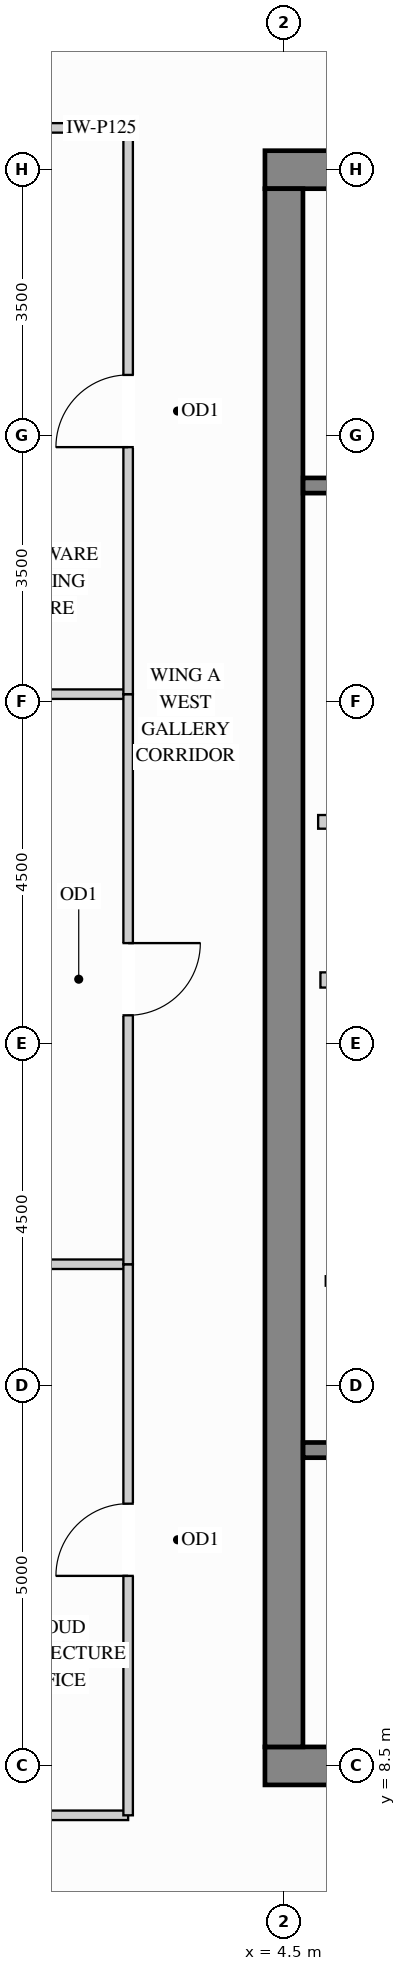
"""IFC4 building model, lengths in metres.
Left out: names, types, materials, properties, quantities, classifications, styles, units other than length and angle.
Written with IfcOpenShell. Run it as: python <this file> out.ifc"""

import sys

from ifc_helpers import new_model, si_unit, direction, frame, frame_2d, origin, place, context, subcontext, project, spatial, rectangle, extrude, source, transform, mapped, element, fill, save


model = new_model("IFC4")
c1 = context("Model", 3, precision=1e-05, world=origin(), true_north=direction((0.0, 1.0)))
c2 = subcontext(c1, "Body", "Model", "MODEL_VIEW")
j1 = project(units=[si_unit("LENGTHUNIT", "METRE"), si_unit("PLANEANGLEUNIT", "RADIAN")], contexts=[c1])
p1 = place(None, origin())
s1 = spatial("IfcSite", under=j1, at=p1, CompositionType="ELEMENT")
p2 = place(p1, origin())
s2 = spatial("IfcBuilding", under=s1, at=p2, CompositionType="ELEMENT")
p3 = place(p2, frame((0.0, 0.0, 266.4)))
s3 = spatial("IfcBuildingStorey", under=s2, at=p3, CompositionType="ELEMENT", Elevation=266.4)
m1 = source(origin(), c2, "Body", "SweptSolid", [
    extrude(rectangle(XDim=10.5, YDim=0.5, at=frame_2d((5.25, 0.0))), origin(), (0.0, 0.0, 1.0), 3.4),
])
for number, where, z_axis, x_axis in (
    (1, (4.25, 29.5, 0.0), (0.0, 0.0, 1.0), (1.0, 0.0, 0.0)),
    (2, (4.25, 8.5, 0.0), (0.0, 0.0, 1.0), (1.0, 0.0, 0.0)),
):
    element("IfcWall", number, at=place(p3, frame(where, z_axis=z_axis, x_axis=x_axis)), inside=s3, PredefinedType="SHEAR", context=c2, shape_type="MappedRepresentation", body=[
        mapped(m1, transform((0.0, 0.0, 0.0), x_axis=(1.0, 0.0, 0.0), y_axis=(0.0, 1.0, 0.0), z_axis=(0.0, 0.0, 1.0))),
    ])
m2 = source(origin(), c2, "Body", "SweptSolid", [
    extrude(rectangle(XDim=20.5, YDim=0.5, at=frame_2d((10.25, 0.0))), origin(), (0.0, 0.0, 1.0), 3.4),
])
p4 = place(p3, frame((4.5, 8.75, 0.0), z_axis=(0.0, 0.0, 1.0), x_axis=(0.0, 1.0, 0.0)))
e3 = element("IfcWall", 3, at=p4, inside=s3, PredefinedType="SHEAR", context=c2, shape_type="MappedRepresentation", body=[
    mapped(m2, transform((0.0, 0.0, 0.0), x_axis=(1.0, 0.0, 0.0), y_axis=(0.0, 1.0, 0.0), z_axis=(0.0, 0.0, 1.0))),
])
m3 = source(origin(), c2, "Body", "SweptSolid", [
    extrude(rectangle(XDim=2.2, YDim=0.18, at=frame_2d((1.1, 0.0))), origin(), (0.0, 0.0, 1.0), 3.385),
])
p5 = place(p3, frame((4.95, 20.92, 0.0), z_axis=(0.0, 0.0, 1.0), x_axis=(1.0, 0.0, 0.0)))
e4 = element("IfcWall", 4, at=p5, inside=s3, PredefinedType="PARTITIONING", context=c2, shape_type="MappedRepresentation", body=[
    mapped(m3, transform((0.0, 0.0, 0.0), x_axis=(1.0, 0.0, 0.0), y_axis=(0.0, 1.0, 0.0), z_axis=(0.0, 0.0, 1.0))),
])
p6 = place(p3, frame((5.05, 14.88, 0.0), z_axis=(0.0, 0.0, 1.0), x_axis=(1.0, 0.0, 0.0)))
e5 = element("IfcWall", 5, at=p6, inside=s3, PredefinedType="PARTITIONING", context=c2, shape_type="SweptSolid", body=[
    extrude(rectangle(XDim=2.35, YDim=0.125, at=frame_2d((1.175, 0.0))), origin(), (0.0, 0.0, 1.0), 3.385),
])
p7 = place(p6, frame((0.7, 0.0, 0.0)))
e6 = element("IfcOpeningElement", 6, at=p7, cuts=e5, PredefinedType="OPENING", context=c2, shape_type="SweptSolid", body=[
    extrude(rectangle(XDim=0.85, YDim=2.1, at=frame_2d((0.425, 1.05))), frame((0.0, 0.073, 0.0), z_axis=(0.0, -1.0, 0.0), x_axis=(1.0, 0.0, 0.0)), (0.0, 0.0, 1.0), 0.145),
])
m4 = source(origin(), c2, "Body", "SweptSolid", [
    extrude(rectangle(XDim=1.4, YDim=0.125, at=frame_2d((0.7, 0.0))), origin(), (0.0, 0.0, 1.0), 3.385),
])
p8 = place(p3, frame((1.05, 30.05, 0.0), z_axis=(0.0, 0.0, 1.0), x_axis=(1.0, 0.0, 0.0)))
e7 = element("IfcWall", 7, at=p8, inside=s3, PredefinedType="PARTITIONING", context=c2, shape_type="MappedRepresentation", body=[
    mapped(m4, transform((0.0, 0.0, 0.0), x_axis=(1.0, 0.0, 0.0), y_axis=(0.0, 1.0, 0.0), z_axis=(0.0, 0.0, 1.0))),
])
m5 = source(origin(), c2, "Body", "SweptSolid", [
    extrude(rectangle(XDim=2.098, YDim=0.125, at=frame_2d((1.049, 0.0))), origin(), (0.0, 0.0, 1.0), 3.385),
])
for number, where, z_axis, x_axis in (
    (8, (0.352, 7.85, 0.0), (0.0, 0.0, 1.0), (1.0, 0.0, 0.0)),
    (9, (0.352, 15.1, 0.0), (0.0, 0.0, 1.0), (1.0, 0.0, 0.0)),
):
    element("IfcWall", number, at=place(p3, frame(where, z_axis=z_axis, x_axis=x_axis)), inside=s3, PredefinedType="PARTITIONING", context=c2, shape_type="MappedRepresentation", body=[
        mapped(m5, transform((0.0, 0.0, 0.0), x_axis=(1.0, 0.0, 0.0), y_axis=(0.0, 1.0, 0.0), z_axis=(0.0, 0.0, 1.0))),
    ])
p9 = place(p3, frame((1.05, 22.6, 0.0), z_axis=(0.0, 0.0, 1.0), x_axis=(1.0, 0.0, 0.0)))
e10 = element("IfcWall", 10, at=p9, inside=s3, PredefinedType="PARTITIONING", context=c2, shape_type="MappedRepresentation", body=[
    mapped(m4, transform((0.0, 0.0, 0.0), x_axis=(1.0, 0.0, 0.0), y_axis=(0.0, 1.0, 0.0), z_axis=(0.0, 0.0, 1.0))),
])
p10 = place(p3, frame((2.45, 7.85, 0.0), z_axis=(0.0, 0.0, 1.0), x_axis=(0.0, 1.0, 0.0)))
e11 = element("IfcWall", 11, at=p10, inside=s3, PredefinedType="PARTITIONING", context=c2, shape_type="SweptSolid", body=[
    extrude(rectangle(XDim=7.25, YDim=0.125, at=frame_2d((3.625, 0.0))), origin(), (0.0, 0.0, 1.0), 3.385),
])
p11 = place(p10, frame((3.15, 0.0, 0.0)))
e12 = element("IfcOpeningElement", 12, at=p11, cuts=e11, PredefinedType="OPENING", context=c2, shape_type="SweptSolid", body=[
    extrude(rectangle(XDim=0.95, YDim=2.15, at=frame_2d((0.475, 1.075))), frame((0.0, 0.073, 0.0), z_axis=(0.0, -1.0, 0.0), x_axis=(1.0, 0.0, 0.0)), (0.0, 0.0, 1.0), 0.145),
])
p12 = place(p3, frame((2.45, 15.1, 0.0), z_axis=(0.0, 0.0, 1.0), x_axis=(0.0, 1.0, 0.0)))
e13 = element("IfcWall", 13, at=p12, inside=s3, PredefinedType="PARTITIONING", context=c2, shape_type="SweptSolid", body=[
    extrude(rectangle(XDim=7.5, YDim=0.125, at=frame_2d((3.75, 0.0))), origin(), (0.0, 0.0, 1.0), 3.385),
])
p13 = place(p12, frame((3.275, 0.0, 0.0)))
e14 = element("IfcOpeningElement", 14, at=p13, cuts=e13, PredefinedType="OPENING", context=c2, shape_type="SweptSolid", body=[
    extrude(rectangle(XDim=0.95, YDim=2.15, at=frame_2d((0.475, 1.075))), frame((0.0, 0.073, 0.0), z_axis=(0.0, -1.0, 0.0), x_axis=(1.0, 0.0, 0.0)), (0.0, 0.0, 1.0), 0.145),
])
p14 = place(p3, frame((2.45, 22.6, 0.0), z_axis=(0.0, 0.0, 1.0), x_axis=(0.0, 1.0, 0.0)))
e15 = element("IfcWall", 15, at=p14, inside=s3, PredefinedType="PARTITIONING", context=c2, shape_type="SweptSolid", body=[
    extrude(rectangle(XDim=7.45, YDim=0.125, at=frame_2d((3.725, 0.0))), origin(), (0.0, 0.0, 1.0), 3.385),
])
p15 = place(p14, frame((3.25, 0.0, 0.0)))
e16 = element("IfcOpeningElement", 16, at=p15, cuts=e15, PredefinedType="OPENING", context=c2, shape_type="SweptSolid", body=[
    extrude(rectangle(XDim=0.95, YDim=2.15, at=frame_2d((0.475, 1.075))), frame((0.0, 0.073, 0.0), z_axis=(0.0, -1.0, 0.0), x_axis=(1.0, 0.0, 0.0)), (0.0, 0.0, 1.0), 0.145),
])
m6 = source(origin(), c2, "Body", "SweptSolid", [
    extrude(rectangle(XDim=2.09, YDim=0.2, at=frame_2d((1.045, 0.0))), origin(), (0.0, 0.0, 1.0), 3.385),
])
p16 = place(p3, frame((4.98, 18.84, 0.0), z_axis=(0.0, 0.0, 1.0), x_axis=(1.0, 0.0, 0.0)))
e17 = element("IfcWall", 17, at=p16, inside=s3, PredefinedType="PARTITIONING", context=c2, shape_type="MappedRepresentation", body=[
    mapped(m6, transform((0.0, 0.0, 0.0), x_axis=(1.0, 0.0, 0.0), y_axis=(0.0, 1.0, 0.0), z_axis=(0.0, 0.0, 1.0))),
])
p17 = place(p3, frame((4.752, 12.655, 0.0), z_axis=(0.0, 0.0, 1.0), x_axis=(1.0, 0.0, 0.0)))
e18 = element("IfcWall", 18, at=p17, inside=s3, PredefinedType="SHEAR", context=c2, shape_type="SweptSolid", body=[
    extrude(rectangle(XDim=7.653, YDim=0.2, at=frame_2d((3.827, 0.0))), origin(), (0.0, 0.0, 1.0), 3.4),
])
p18 = place(p17, frame((0.4, 0.0, 0.0)))
e19 = element("IfcOpeningElement", 19, at=p18, cuts=e18, PredefinedType="OPENING", context=c2, shape_type="SweptSolid", body=[
    extrude(rectangle(XDim=1.1, YDim=2.15, at=frame_2d((0.55, 1.075))), frame((0.0, 0.11, 0.0), z_axis=(0.0, -1.0, 0.0), x_axis=(1.0, 0.0, 0.0)), (0.0, 0.0, 1.0), 0.22),
])
p19 = place(p3, frame((4.752, 25.345, 0.0), z_axis=(0.0, 0.0, 1.0), x_axis=(1.0, 0.0, 0.0)))
e20 = element("IfcWall", 20, at=p19, inside=s3, PredefinedType="SHEAR", context=c2, shape_type="SweptSolid", body=[
    extrude(rectangle(XDim=7.653, YDim=0.2, at=frame_2d((3.827, 0.0))), origin(), (0.0, 0.0, 1.0), 3.4),
])
p20 = place(p19, frame((0.4, 0.0, 0.0)))
e21 = element("IfcOpeningElement", 21, at=p20, cuts=e20, PredefinedType="OPENING", context=c2, shape_type="SweptSolid", body=[
    extrude(rectangle(XDim=1.1, YDim=2.15, at=frame_2d((0.55, 1.075))), frame((0.0, 0.11, 0.0), z_axis=(0.0, -1.0, 0.0), x_axis=(1.0, 0.0, 0.0)), (0.0, 0.0, 1.0), 0.22),
])
m7 = source(origin(), c2, "Body", "SweptSolid", [
    extrude(rectangle(XDim=0.95, YDim=2.15, at=frame_2d((0.475, 1.075))), frame((0.0, 0.025, 0.0), z_axis=(0.0, -1.0, 0.0), x_axis=(1.0, 0.0, 0.0)), (0.0, 0.0, 1.0), 0.05),
])
p21 = place(p11, origin())
e22 = element("IfcDoor", 22, at=p21, inside=s3, OperationType="SINGLE_SWING_LEFT", PredefinedType="DOOR", context=c2, shape_type="MappedRepresentation", body=[
    mapped(m7, transform((0.0, 0.0, 0.0), x_axis=(1.0, 0.0, 0.0), y_axis=(0.0, 1.0, 0.0), z_axis=(0.0, 0.0, 1.0))),
])
fill(e12, e22)
p22 = place(p13, origin())
e23 = element("IfcDoor", 23, at=p22, inside=s3, OperationType="SINGLE_SWING_RIGHT", PredefinedType="DOOR", context=c2, shape_type="MappedRepresentation", body=[
    mapped(m7, transform((0.0, 0.0, 0.0), x_axis=(1.0, 0.0, 0.0), y_axis=(0.0, 1.0, 0.0), z_axis=(0.0, 0.0, 1.0))),
])
fill(e14, e23)
p23 = place(p15, origin())
e24 = element("IfcDoor", 24, at=p23, inside=s3, OperationType="SINGLE_SWING_LEFT", PredefinedType="DOOR", context=c2, shape_type="MappedRepresentation", body=[
    mapped(m7, transform((0.0, 0.0, 0.0), x_axis=(1.0, 0.0, 0.0), y_axis=(0.0, 1.0, 0.0), z_axis=(0.0, 0.0, 1.0))),
])
fill(e16, e24)
save(model, sys.argv[1])
